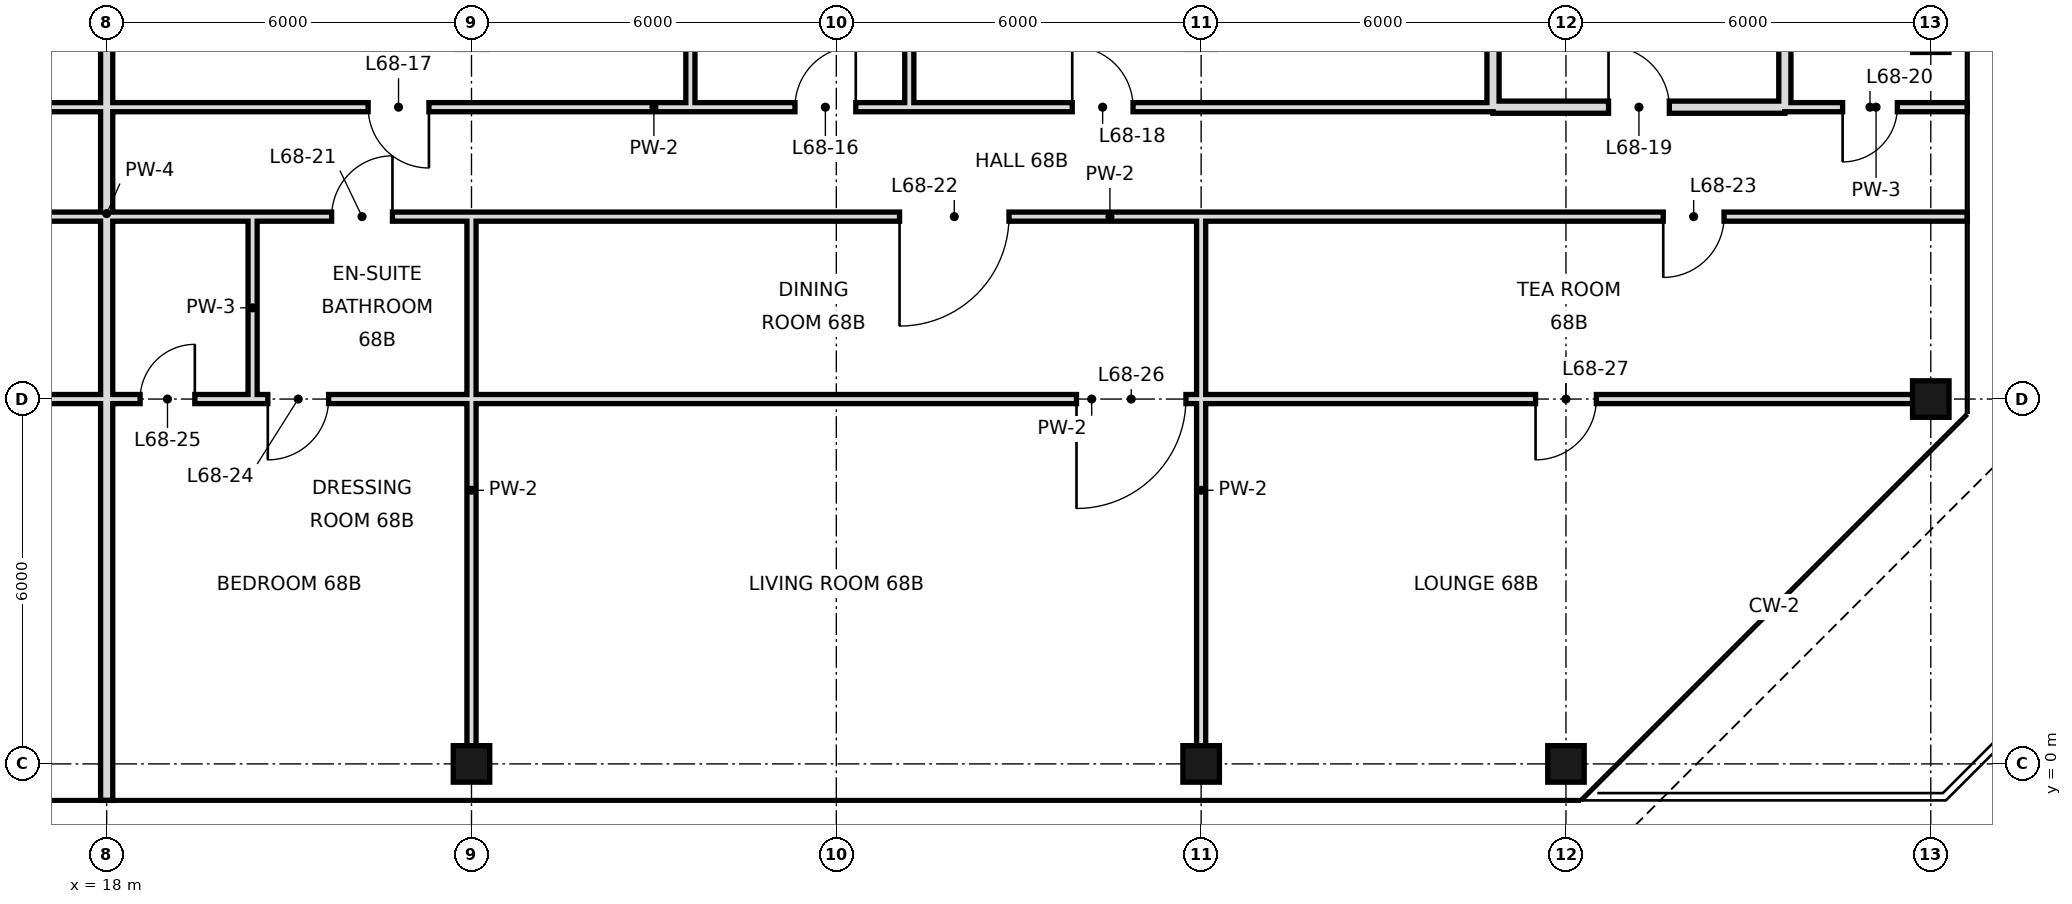
"""IFC4 building model, lengths in metres.
Left out: names, types, materials, properties, quantities, classifications, styles, units other than length and angle.
Written with IfcOpenShell. Run it as: python <this file> out.ifc"""

import sys

from ifc_helpers import new_model, si_unit, direction, frame, frame_2d, origin, origin_2d, place, context, subcontext, project, spatial, rectangle, hollow_rectangle, extrude, element, fill, save


model = new_model("IFC4")
c1 = context("Model", 3, precision=1e-05, world=origin(), true_north=direction((0.0, 1.0)))
c2 = subcontext(c1, "Body", "Model", "MODEL_VIEW")
j1 = project(units=[si_unit("LENGTHUNIT", "METRE"), si_unit("PLANEANGLEUNIT", "RADIAN")], contexts=[c1])
p1 = place(None, origin())
s1 = spatial("IfcSite", under=j1, at=p1, CompositionType="ELEMENT")
p2 = place(p1, origin())
s2 = spatial("IfcBuilding", under=s1, at=p2, CompositionType="ELEMENT")
p3 = place(p2, frame((0.0, 0.0, 290.8)))
s3 = spatial("IfcBuildingStorey", under=s2, at=p3, CompositionType="ELEMENT", Elevation=290.8)
for number, where, z_axis, x_axis in (
    (1, (24.0, 0.0, 0.0), (0.0, 0.0, 1.0), (1.0, 0.0, 0.0)),
    (2, (36.0, 0.0, 0.0), (0.0, 0.0, 1.0), (1.0, 0.0, 0.0)),
):
    element("IfcColumn", number, at=place(p3, frame(where, z_axis=z_axis, x_axis=x_axis)), inside=s3, PredefinedType="COLUMN", context=c2, shape_type="SweptSolid", body=[
        extrude(hollow_rectangle(XDim=0.6, YDim=0.6, WallThickness=0.028, at=origin_2d()), origin(), (0.0, 0.0, 1.0), 3.6),
    ])
for number, where, z_axis, x_axis in (
    (3, (42.0, 0.0, -0.3), (0.0, 0.0, 1.0), (1.0, 0.0, 0.0)),
    (4, (48.0, 6.0, -0.3), (0.0, 0.0, 1.0), (1.0, 0.0, 0.0)),
):
    element("IfcColumn", number, at=place(p3, frame(where, z_axis=z_axis, x_axis=x_axis)), inside=s3, PredefinedType="COLUMN", context=c2, shape_type="SweptSolid", body=[
        extrude(hollow_rectangle(XDim=0.6, YDim=0.6, WallThickness=0.028, at=origin_2d()), origin(), (0.0, 0.0, 1.0), 3.9),
    ])
p4 = place(p3, frame((18.0, -0.6, 0.0), z_axis=(0.0, 0.0, 1.0), x_axis=(0.0, 1.0, 0.0)))
e5 = element("IfcWall", 5, at=p4, inside=s3, PredefinedType="SOLIDWALL", context=c2, shape_type="SweptSolid", body=[
    extrude(rectangle(XDim=19.3, YDim=0.2, at=frame_2d((9.65, 0.0))), origin(), (0.0, 0.0, 1.0), 2.72),
])
p5 = place(p3, frame((20.4, 6.0, 0.0), z_axis=(0.0, 0.0, 1.0), x_axis=(0.0, 1.0, 0.0)))
e6 = element("IfcWall", 6, at=p5, inside=s3, PredefinedType="PARTITIONING", context=c2, shape_type="SweptSolid", body=[
    extrude(rectangle(XDim=3.0, YDim=0.15, at=frame_2d((1.5, 0.0))), origin(), (0.0, 0.0, 1.0), 3.42),
])
p6 = place(p3, frame((24.0, 0.0, 0.0), z_axis=(0.0, 0.0, 1.0), x_axis=(0.0, 1.0, 0.0)))
e7 = element("IfcWall", 7, at=p6, inside=s3, PredefinedType="PARTITIONING", context=c2, shape_type="SweptSolid", body=[
    extrude(rectangle(XDim=9.0, YDim=0.15, at=frame_2d((4.5, 0.0))), origin(), (0.0, 0.0, 1.0), 2.72),
])
for number, where, z_axis, x_axis in (
    (8, (27.6, 10.8, 0.0), (0.0, 0.0, 1.0), (0.0, 1.0, 0.0)),
    (9, (31.2, 10.8, 0.0), (0.0, 0.0, 1.0), (0.0, 1.0, 0.0)),
):
    element("IfcWall", number, at=place(p3, frame(where, z_axis=z_axis, x_axis=x_axis)), inside=s3, PredefinedType="PARTITIONING", context=c2, shape_type="SweptSolid", body=[
        extrude(rectangle(XDim=7.9, YDim=0.15, at=frame_2d((3.95, 0.0))), origin(), (0.0, 0.0, 1.0), 3.42),
    ])
p7 = place(p3, frame((36.0, 0.0, 0.0), z_axis=(0.0, 0.0, 1.0), x_axis=(0.0, 1.0, 0.0)))
e10 = element("IfcWall", 10, at=p7, inside=s3, PredefinedType="PARTITIONING", context=c2, shape_type="SweptSolid", body=[
    extrude(rectangle(XDim=9.0, YDim=0.15, at=frame_2d((4.5, 0.0))), origin(), (0.0, 0.0, 1.0), 2.72),
])
p8 = place(p3, frame((40.8, 10.8, 0.0), z_axis=(0.0, 0.0, 1.0), x_axis=(0.0, 1.0, 0.0)))
e11 = element("IfcWall", 11, at=p8, inside=s3, PredefinedType="SOLIDWALL", context=c2, shape_type="SweptSolid", body=[
    extrude(rectangle(XDim=7.9, YDim=0.2, at=frame_2d((3.95, 0.0))), origin(), (0.0, 0.0, 1.0), 2.72),
])
p9 = place(p3, frame((45.6, 10.8, 0.0), z_axis=(0.0, 0.0, 1.0), x_axis=(0.0, 1.0, 0.0)))
e12 = element("IfcWall", 12, at=p9, inside=s3, PredefinedType="SOLIDWALL", context=c2, shape_type="SweptSolid", body=[
    extrude(rectangle(XDim=7.2, YDim=0.2, at=frame_2d((3.6, 0.0))), origin(), (0.0, 0.0, 1.0), 2.72),
])
p10 = place(p3, frame((40.8, 10.8, 0.0), z_axis=(0.0, 0.0, 1.0), x_axis=(1.0, 0.0, 0.0)))
e13 = element("IfcWall", 13, at=p10, inside=s3, PredefinedType="SOLIDWALL", context=c2, shape_type="SweptSolid", body=[
    extrude(rectangle(XDim=4.8, YDim=0.2, at=frame_2d((2.4, 0.0))), origin(), (0.0, 0.0, 1.0), 2.72),
])
p11 = place(p10, frame((1.9, 0.0, 0.0)))
e14 = element("IfcOpeningElement", 14, at=p11, cuts=e13, PredefinedType="OPENING", context=c2, shape_type="SweptSolid", body=[
    extrude(rectangle(XDim=1.0, YDim=2.4, at=frame_2d((0.5, 1.2))), frame((0.0, 0.11, 0.0), z_axis=(0.0, -1.0, 0.0), x_axis=(1.0, 0.0, 0.0)), (0.0, 0.0, 1.0), 0.22),
])
p12 = place(p3, frame((13.2, 10.8, 0.0), z_axis=(0.0, 0.0, 1.0), x_axis=(1.0, 0.0, 0.0)))
e15 = element("IfcWall", 15, at=p12, inside=s3, PredefinedType="PARTITIONING", context=c2, shape_type="SweptSolid", body=[
    extrude(rectangle(XDim=27.6, YDim=0.15, at=frame_2d((13.8, 0.0))), origin(), (0.0, 0.0, 1.0), 3.42),
])
p13 = place(p12, frame((2.56, 0.0, 0.0)))
e16 = element("IfcOpeningElement", 16, at=p13, cuts=e15, PredefinedType="OPENING", context=c2, shape_type="SweptSolid", body=[
    extrude(rectangle(XDim=1.0, YDim=2.4, at=frame_2d((0.5, 1.2))), frame((0.0, 0.085, 0.0), z_axis=(0.0, -1.0, 0.0), x_axis=(1.0, 0.0, 0.0)), (0.0, 0.0, 1.0), 0.17),
])
p14 = place(p12, frame((16.12, 0.0, 0.0)))
e17 = element("IfcOpeningElement", 17, at=p14, cuts=e15, PredefinedType="OPENING", context=c2, shape_type="SweptSolid", body=[
    extrude(rectangle(XDim=1.0, YDim=2.4, at=frame_2d((0.5, 1.2))), frame((0.0, 0.085, 0.0), z_axis=(0.0, -1.0, 0.0), x_axis=(1.0, 0.0, 0.0)), (0.0, 0.0, 1.0), 0.17),
])
p15 = place(p12, frame((9.1, 0.0, 0.0)))
e18 = element("IfcOpeningElement", 18, at=p15, cuts=e15, PredefinedType="OPENING", context=c2, shape_type="SweptSolid", body=[
    extrude(rectangle(XDim=1.0, YDim=2.4, at=frame_2d((0.5, 1.2))), frame((0.0, 0.085, 0.0), z_axis=(0.0, -1.0, 0.0), x_axis=(1.0, 0.0, 0.0)), (0.0, 0.0, 1.0), 0.17),
])
p16 = place(p12, frame((20.68, 0.0, 0.0)))
e19 = element("IfcOpeningElement", 19, at=p16, cuts=e15, PredefinedType="OPENING", context=c2, shape_type="SweptSolid", body=[
    extrude(rectangle(XDim=1.0, YDim=2.4, at=frame_2d((0.5, 1.2))), frame((0.0, 0.085, 0.0), z_axis=(0.0, -1.0, 0.0), x_axis=(1.0, 0.0, 0.0)), (0.0, 0.0, 1.0), 0.17),
])
p17 = place(p3, frame((45.6, 10.8, 0.0), z_axis=(0.0, 0.0, 1.0), x_axis=(1.0, 0.0, 0.0)))
e20 = element("IfcWall", 20, at=p17, inside=s3, PredefinedType="PARTITIONING", context=c2, shape_type="SweptSolid", body=[
    extrude(rectangle(XDim=3.0, YDim=0.15, at=frame_2d((1.5, 0.0))), origin(), (0.0, 0.0, 1.0), 3.42),
])
p18 = place(p17, frame((0.95, 0.0, 0.0)))
e21 = element("IfcOpeningElement", 21, at=p18, cuts=e20, PredefinedType="OPENING", context=c2, shape_type="SweptSolid", body=[
    extrude(rectangle(XDim=0.9, YDim=2.4, at=frame_2d((0.45, 1.2))), frame((0.0, 0.085, 0.0), z_axis=(0.0, -1.0, 0.0), x_axis=(1.0, 0.0, 0.0)), (0.0, 0.0, 1.0), 0.17),
])
p19 = place(p3, frame((6.0, 6.0, 0.0), z_axis=(0.0, 0.0, 1.0), x_axis=(1.0, 0.0, 0.0)))
e22 = element("IfcWall", 22, at=p19, inside=s3, PredefinedType="PARTITIONING", context=c2, shape_type="SweptSolid", body=[
    extrude(rectangle(XDim=12.0, YDim=0.15, at=frame_2d((6.0, 0.0))), origin(), (0.0, 0.0, 1.0), 2.97),
])
p20 = place(p19, frame((5.1, 0.0, 0.0)))
e23 = element("IfcOpeningElement", 23, at=p20, cuts=e22, PredefinedType="OPENING", context=c2, shape_type="SweptSolid", body=[
    extrude(rectangle(XDim=1.8, YDim=2.4, at=frame_2d((0.9, 1.2))), frame((0.0, 0.085, 0.0), z_axis=(0.0, -1.0, 0.0), x_axis=(1.0, 0.0, 0.0)), (0.0, 0.0, 1.0), 0.17),
])
p21 = place(p3, frame((20.4, 6.0, 0.0), z_axis=(0.0, 0.0, 1.0), x_axis=(1.0, 0.0, 0.0)))
e24 = element("IfcWall", 24, at=p21, inside=s3, PredefinedType="PARTITIONING", context=c2, shape_type="SweptSolid", body=[
    extrude(rectangle(XDim=27.6, YDim=0.15, at=frame_2d((13.8, 0.0))), origin(), (0.0, 0.0, 1.0), 2.97),
])
p22 = place(p21, frame((0.25, 0.0, 0.0)))
e25 = element("IfcOpeningElement", 25, at=p22, cuts=e24, PredefinedType="OPENING", context=c2, shape_type="SweptSolid", body=[
    extrude(rectangle(XDim=1.0, YDim=2.4, at=frame_2d((0.5, 1.2))), frame((0.0, 0.085, 0.0), z_axis=(0.0, -1.0, 0.0), x_axis=(1.0, 0.0, 0.0)), (0.0, 0.0, 1.0), 0.17),
])
p23 = place(p21, frame((13.55, 0.0, 0.0)))
e26 = element("IfcOpeningElement", 26, at=p23, cuts=e24, PredefinedType="OPENING", context=c2, shape_type="SweptSolid", body=[
    extrude(rectangle(XDim=1.8, YDim=2.4, at=frame_2d((0.9, 1.2))), frame((0.0, 0.085, 0.0), z_axis=(0.0, -1.0, 0.0), x_axis=(1.0, 0.0, 0.0)), (0.0, 0.0, 1.0), 0.17),
])
p24 = place(p21, frame((21.1, 0.0, 0.0)))
e27 = element("IfcOpeningElement", 27, at=p24, cuts=e24, PredefinedType="OPENING", context=c2, shape_type="SweptSolid", body=[
    extrude(rectangle(XDim=1.0, YDim=2.4, at=frame_2d((0.5, 1.2))), frame((0.0, 0.085, 0.0), z_axis=(0.0, -1.0, 0.0), x_axis=(1.0, 0.0, 0.0)), (0.0, 0.0, 1.0), 0.17),
])
p25 = place(p3, frame((18.0, 6.0, 0.0), z_axis=(0.0, 0.0, 1.0), x_axis=(1.0, 0.0, 0.0)))
e28 = element("IfcWall", 28, at=p25, inside=s3, PredefinedType="PARTITIONING", context=c2, shape_type="SweptSolid", body=[
    extrude(rectangle(XDim=2.4, YDim=0.15, at=frame_2d((1.2, 0.0))), origin(), (0.0, 0.0, 1.0), 2.97),
])
p26 = place(p25, frame((0.55, 0.0, 0.0)))
e29 = element("IfcOpeningElement", 29, at=p26, cuts=e28, PredefinedType="OPENING", context=c2, shape_type="SweptSolid", body=[
    extrude(rectangle(XDim=0.9, YDim=2.4, at=frame_2d((0.45, 1.2))), frame((0.0, 0.085, 0.0), z_axis=(0.0, -1.0, 0.0), x_axis=(1.0, 0.0, 0.0)), (0.0, 0.0, 1.0), 0.17),
])
p27 = place(p3, frame((6.0, 9.0, 0.0), z_axis=(0.0, 0.0, 1.0), x_axis=(1.0, 0.0, 0.0)))
e30 = element("IfcWall", 30, at=p27, inside=s3, PredefinedType="PARTITIONING", context=c2, shape_type="SweptSolid", body=[
    extrude(rectangle(XDim=12.0, YDim=0.15, at=frame_2d((6.0, 0.0))), origin(), (0.0, 0.0, 1.0), 3.42),
])
p28 = place(p27, frame((5.1, 0.0, 0.0)))
e31 = element("IfcOpeningElement", 31, at=p28, cuts=e30, PredefinedType="OPENING", context=c2, shape_type="SweptSolid", body=[
    extrude(rectangle(XDim=1.8, YDim=2.4, at=frame_2d((0.9, 1.2))), frame((0.0, 0.085, 0.0), z_axis=(0.0, -1.0, 0.0), x_axis=(1.0, 0.0, 0.0)), (0.0, 0.0, 1.0), 0.17),
])
p29 = place(p3, frame((20.4, 9.0, 0.0), z_axis=(0.0, 0.0, 1.0), x_axis=(1.0, 0.0, 0.0)))
e32 = element("IfcWall", 32, at=p29, inside=s3, PredefinedType="PARTITIONING", context=c2, shape_type="SweptSolid", body=[
    extrude(rectangle(XDim=28.2, YDim=0.15, at=frame_2d((14.1, 0.0))), origin(), (0.0, 0.0, 1.0), 3.42),
])
p30 = place(p29, frame((1.3, 0.0, 0.0)))
e33 = element("IfcOpeningElement", 33, at=p30, cuts=e32, PredefinedType="OPENING", context=c2, shape_type="SweptSolid", body=[
    extrude(rectangle(XDim=1.0, YDim=2.4, at=frame_2d((0.5, 1.2))), frame((0.0, 0.085, 0.0), z_axis=(0.0, -1.0, 0.0), x_axis=(1.0, 0.0, 0.0)), (0.0, 0.0, 1.0), 0.17),
])
p31 = place(p29, frame((10.64, 0.0, 0.0)))
e34 = element("IfcOpeningElement", 34, at=p31, cuts=e32, PredefinedType="OPENING", context=c2, shape_type="SweptSolid", body=[
    extrude(rectangle(XDim=1.8, YDim=2.4, at=frame_2d((0.9, 1.2))), frame((0.0, 0.085, 0.0), z_axis=(0.0, -1.0, 0.0), x_axis=(1.0, 0.0, 0.0)), (0.0, 0.0, 1.0), 0.17),
])
p32 = place(p29, frame((23.2, 0.0, 0.0)))
e35 = element("IfcOpeningElement", 35, at=p32, cuts=e32, PredefinedType="OPENING", context=c2, shape_type="SweptSolid", body=[
    extrude(rectangle(XDim=1.0, YDim=2.4, at=frame_2d((0.5, 1.2))), frame((0.0, 0.085, 0.0), z_axis=(0.0, -1.0, 0.0), x_axis=(1.0, 0.0, 0.0)), (0.0, 0.0, 1.0), 0.17),
])
p33 = place(p3, frame((18.0, 9.0, 0.0), z_axis=(0.0, 0.0, 1.0), x_axis=(1.0, 0.0, 0.0)))
e36 = element("IfcWall", 36, at=p33, inside=s3, PredefinedType="PARTITIONING", context=c2, shape_type="SweptSolid", body=[
    extrude(rectangle(XDim=2.4, YDim=0.15, at=frame_2d((1.2, 0.0))), origin(), (0.0, 0.0, 1.0), 3.42),
])
p34 = place(p14, frame((1.0, 0.0, 0.0), z_axis=(0.0, 0.0, 1.0), x_axis=(-1.0, 0.0, 0.0)))
e37 = element("IfcDoor", 37, at=p34, inside=s3, OperationType="SINGLE_SWING_LEFT", PredefinedType="DOOR", context=c2, shape_type="SweptSolid", body=[
    extrude(rectangle(XDim=1.0, YDim=2.4, at=frame_2d((0.5, 1.2))), frame((0.0, 0.025, 0.0), z_axis=(0.0, -1.0, 0.0), x_axis=(1.0, 0.0, 0.0)), (0.0, 0.0, 1.0), 0.05),
])
fill(e17, e37)
p35 = place(p15, origin())
e38 = element("IfcDoor", 38, at=p35, inside=s3, OperationType="SINGLE_SWING_RIGHT", PredefinedType="DOOR", context=c2, shape_type="SweptSolid", body=[
    extrude(rectangle(XDim=1.0, YDim=2.4, at=frame_2d((0.5, 1.2))), frame((0.0, 0.025, 0.0), z_axis=(0.0, -1.0, 0.0), x_axis=(1.0, 0.0, 0.0)), (0.0, 0.0, 1.0), 0.05),
])
fill(e18, e38)
p36 = place(p16, origin())
e39 = element("IfcDoor", 39, at=p36, inside=s3, OperationType="SINGLE_SWING_LEFT", PredefinedType="DOOR", context=c2, shape_type="SweptSolid", body=[
    extrude(rectangle(XDim=1.0, YDim=2.4, at=frame_2d((0.5, 1.2))), frame((0.0, 0.025, 0.0), z_axis=(0.0, -1.0, 0.0), x_axis=(1.0, 0.0, 0.0)), (0.0, 0.0, 1.0), 0.05),
])
fill(e19, e39)
p37 = place(p11, origin())
e40 = element("IfcDoor", 40, at=p37, inside=s3, OperationType="SINGLE_SWING_LEFT", PredefinedType="DOOR", context=c2, shape_type="SweptSolid", body=[
    extrude(rectangle(XDim=1.0, YDim=2.4, at=frame_2d((0.5, 1.2))), frame((0.0, 0.025, 0.0), z_axis=(0.0, -1.0, 0.0), x_axis=(1.0, 0.0, 0.0)), (0.0, 0.0, 1.0), 0.05),
])
fill(e14, e40)
p38 = place(p18, frame((0.9, 0.0, 0.0), z_axis=(0.0, 0.0, 1.0), x_axis=(-1.0, 0.0, 0.0)))
e41 = element("IfcDoor", 41, at=p38, inside=s3, OperationType="SINGLE_SWING_RIGHT", PredefinedType="DOOR", context=c2, shape_type="SweptSolid", body=[
    extrude(rectangle(XDim=0.9, YDim=2.4, at=frame_2d((0.45, 1.2))), frame((0.0, 0.025, 0.0), z_axis=(0.0, -1.0, 0.0), x_axis=(1.0, 0.0, 0.0)), (0.0, 0.0, 1.0), 0.05),
])
fill(e21, e41)
p39 = place(p30, frame((1.0, 0.0, 0.0), z_axis=(0.0, 0.0, 1.0), x_axis=(-1.0, 0.0, 0.0)))
e42 = element("IfcDoor", 42, at=p39, inside=s3, OperationType="SINGLE_SWING_LEFT", PredefinedType="DOOR", context=c2, shape_type="SweptSolid", body=[
    extrude(rectangle(XDim=1.0, YDim=2.4, at=frame_2d((0.5, 1.2))), frame((0.0, 0.025, 0.0), z_axis=(0.0, -1.0, 0.0), x_axis=(1.0, 0.0, 0.0)), (0.0, 0.0, 1.0), 0.05),
])
fill(e33, e42)
p40 = place(p31, frame((1.8, 0.0, 0.0), z_axis=(0.0, 0.0, 1.0), x_axis=(-1.0, 0.0, 0.0)))
e43 = element("IfcDoor", 43, at=p40, inside=s3, OperationType="SINGLE_SWING_RIGHT", PredefinedType="DOOR", context=c2, shape_type="SweptSolid", body=[
    extrude(rectangle(XDim=1.8, YDim=2.4, at=frame_2d((0.9, 1.2))), frame((0.0, 0.025, 0.0), z_axis=(0.0, -1.0, 0.0), x_axis=(1.0, 0.0, 0.0)), (0.0, 0.0, 1.0), 0.05),
])
fill(e34, e43)
p41 = place(p32, frame((1.0, 0.0, 0.0), z_axis=(0.0, 0.0, 1.0), x_axis=(-1.0, 0.0, 0.0)))
e44 = element("IfcDoor", 44, at=p41, inside=s3, OperationType="SINGLE_SWING_RIGHT", PredefinedType="DOOR", context=c2, shape_type="SweptSolid", body=[
    extrude(rectangle(XDim=1.0, YDim=2.4, at=frame_2d((0.5, 1.2))), frame((0.0, 0.025, 0.0), z_axis=(0.0, -1.0, 0.0), x_axis=(1.0, 0.0, 0.0)), (0.0, 0.0, 1.0), 0.05),
])
fill(e35, e44)
p42 = place(p22, frame((1.0, 0.0, 0.0), z_axis=(0.0, 0.0, 1.0), x_axis=(-1.0, 0.0, 0.0)))
e45 = element("IfcDoor", 45, at=p42, inside=s3, OperationType="SINGLE_SWING_RIGHT", PredefinedType="DOOR", context=c2, shape_type="SweptSolid", body=[
    extrude(rectangle(XDim=1.0, YDim=2.4, at=frame_2d((0.5, 1.2))), frame((0.0, 0.025, 0.0), z_axis=(0.0, -1.0, 0.0), x_axis=(1.0, 0.0, 0.0)), (0.0, 0.0, 1.0), 0.05),
])
fill(e25, e45)
p43 = place(p26, frame((0.9, 0.0, 0.0), z_axis=(0.0, 0.0, 1.0), x_axis=(-1.0, 0.0, 0.0)))
e46 = element("IfcDoor", 46, at=p43, inside=s3, OperationType="SINGLE_SWING_LEFT", PredefinedType="DOOR", context=c2, shape_type="SweptSolid", body=[
    extrude(rectangle(XDim=0.9, YDim=2.4, at=frame_2d((0.45, 1.2))), frame((0.0, 0.025, 0.0), z_axis=(0.0, -1.0, 0.0), x_axis=(1.0, 0.0, 0.0)), (0.0, 0.0, 1.0), 0.05),
])
fill(e29, e46)
p44 = place(p23, frame((1.8, 0.0, 0.0), z_axis=(0.0, 0.0, 1.0), x_axis=(-1.0, 0.0, 0.0)))
e47 = element("IfcDoor", 47, at=p44, inside=s3, OperationType="SINGLE_SWING_RIGHT", PredefinedType="DOOR", context=c2, shape_type="SweptSolid", body=[
    extrude(rectangle(XDim=1.8, YDim=2.4, at=frame_2d((0.9, 1.2))), frame((0.0, 0.025, 0.0), z_axis=(0.0, -1.0, 0.0), x_axis=(1.0, 0.0, 0.0)), (0.0, 0.0, 1.0), 0.05),
])
fill(e26, e47)
p45 = place(p24, frame((1.0, 0.0, 0.0), z_axis=(0.0, 0.0, 1.0), x_axis=(-1.0, 0.0, 0.0)))
e48 = element("IfcDoor", 48, at=p45, inside=s3, OperationType="SINGLE_SWING_RIGHT", PredefinedType="DOOR", context=c2, shape_type="SweptSolid", body=[
    extrude(rectangle(XDim=1.0, YDim=2.4, at=frame_2d((0.5, 1.2))), frame((0.0, 0.025, 0.0), z_axis=(0.0, -1.0, 0.0), x_axis=(1.0, 0.0, 0.0)), (0.0, 0.0, 1.0), 0.05),
])
fill(e27, e48)
save(model, sys.argv[1])
